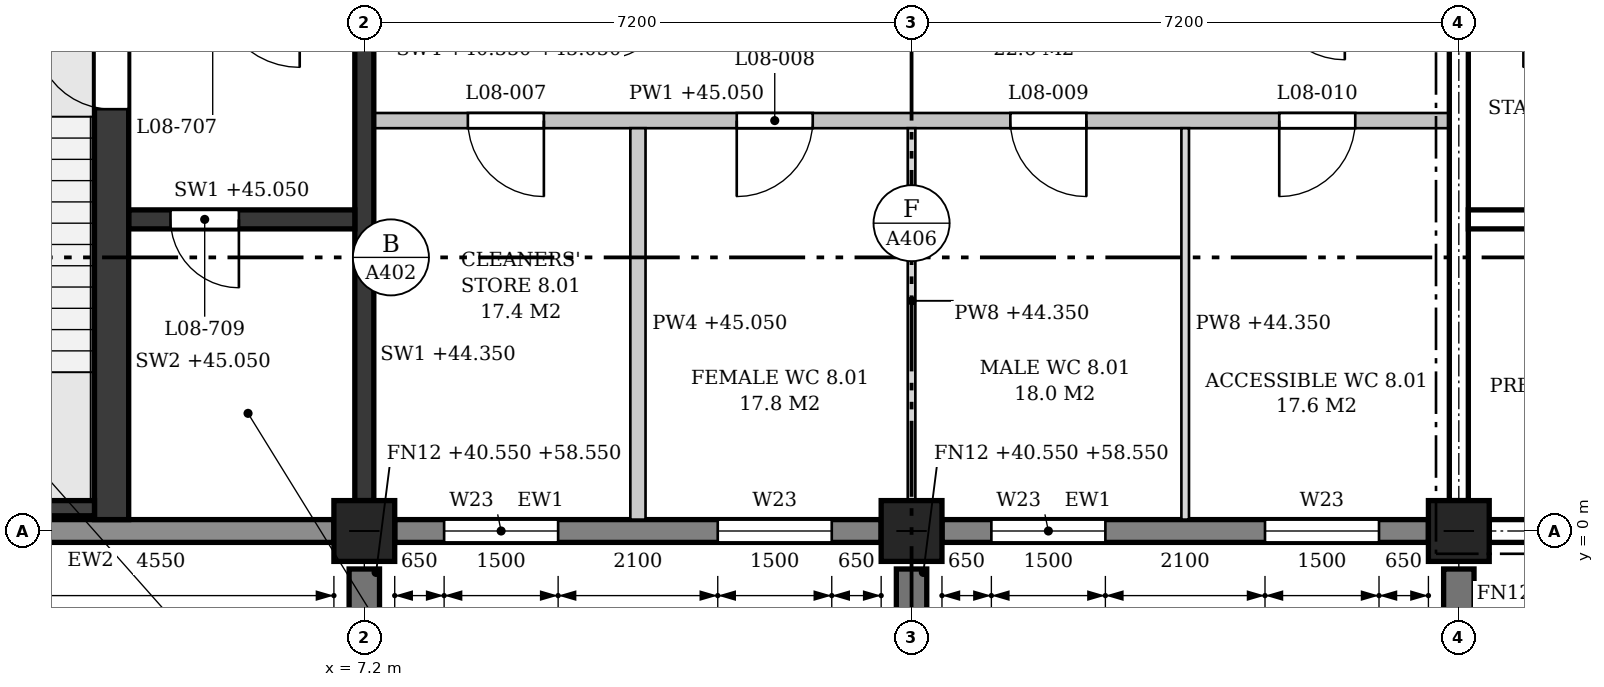
"""IFC4 building model, lengths in metres.
Left out: names, types, materials, properties, quantities, classifications, styles, units other than length and angle.
Written with IfcOpenShell. Run it as: python <this file> out.ifc"""

import sys

from ifc_helpers import new_model, si_unit, direction, frame, frame_2d, origin, origin_2d, place, context, subcontext, project, spatial, polyline, rectangle, outline, extrude, element, fill, save


model = new_model("IFC4")
c1 = context("Model", 3, precision=1e-05, world=origin(), true_north=direction((0.0, 1.0)))
c2 = subcontext(c1, "Body", "Model", "MODEL_VIEW")
j1 = project(units=[si_unit("LENGTHUNIT", "METRE"), si_unit("PLANEANGLEUNIT", "RADIAN")], contexts=[c1])
p1 = place(None, origin())
s1 = spatial("IfcSite", under=j1, at=p1, CompositionType="ELEMENT")
p2 = place(p1, origin())
s2 = spatial("IfcBuilding", under=s1, at=p2, CompositionType="ELEMENT")
p3 = place(p2, frame((0.0, 0.0, 40.8)))
s3 = spatial("IfcBuildingStorey", under=s2, at=p3, CompositionType="ELEMENT", Elevation=40.8)
for number, where, z_axis, x_axis in (
    (1, (7.2, 0.0, 0.0), (0.0, 0.0, 1.0), (1.0, 0.0, 0.0)),
    (2, (14.4, 0.0, 0.0), (0.0, 0.0, 1.0), (1.0, 0.0, 0.0)),
    (3, (21.6, 0.0, 0.0), (0.0, 0.0, 1.0), (1.0, 0.0, 0.0)),
):
    element("IfcColumn", number, at=place(p3, frame(where, z_axis=z_axis, x_axis=x_axis)), inside=s3, PredefinedType="COLUMN", context=c2, shape_type="SweptSolid", body=[
        extrude(rectangle(XDim=0.8, YDim=0.8, at=origin_2d()), origin(), (0.0, 0.0, 1.0), 4.5),
    ])
p4 = place(p3, frame((0.4, 0.0, 0.0), z_axis=(0.0, 0.0, 1.0), x_axis=(1.0, 0.0, 0.0)))
e4 = element("IfcWall", 4, at=p4, inside=s3, PredefinedType="STANDARD", context=c2, shape_type="SweptSolid", body=[
    extrude(rectangle(XDim=6.4, YDim=0.3, at=frame_2d((3.2, 0.0))), origin(), (0.0, 0.0, 1.0), 3.65),
])
p5 = place(p4, frame((0.95, 0.0, 0.9)))
e5 = element("IfcOpeningElement", 5, at=p5, cuts=e4, PredefinedType="OPENING", context=c2, shape_type="SweptSolid", body=[
    extrude(outline(polyline([(0.0, 0.0), (0.9, 0.0), (0.9, 2.25), (0.45, 2.7), (0.0, 2.25), (0.0, 0.0)])), frame((0.0, 0.16, 0.0), z_axis=(0.0, -1.0, 0.0), x_axis=(1.0, 0.0, 0.0)), (0.0, 0.0, 1.0), 0.32),
])
p6 = place(p3, frame((7.6, 0.0, 0.0), z_axis=(0.0, 0.0, 1.0), x_axis=(1.0, 0.0, 0.0)))
e6 = element("IfcWall", 6, at=p6, inside=s3, PredefinedType="STANDARD", context=c2, shape_type="SweptSolid", body=[
    extrude(rectangle(XDim=6.4, YDim=0.3, at=frame_2d((3.2, 0.0))), origin(), (0.0, 0.0, 1.0), 3.65),
])
p7 = place(p6, frame((0.65, 0.0, 0.9)))
e7 = element("IfcOpeningElement", 7, at=p7, cuts=e6, PredefinedType="OPENING", context=c2, shape_type="SweptSolid", body=[
    extrude(outline(polyline([(0.0, 0.0), (1.5, 0.0), (1.5, 1.95), (0.75, 2.7), (0.0, 1.95), (0.0, 0.0)])), frame((0.0, 0.16, 0.0), z_axis=(0.0, -1.0, 0.0), x_axis=(1.0, 0.0, 0.0)), (0.0, 0.0, 1.0), 0.32),
])
p8 = place(p6, frame((4.25, 0.0, 0.9)))
e8 = element("IfcOpeningElement", 8, at=p8, cuts=e6, PredefinedType="OPENING", context=c2, shape_type="SweptSolid", body=[
    extrude(outline(polyline([(0.0, 0.0), (1.5, 0.0), (1.5, 1.95), (0.75, 2.7), (0.0, 1.95), (0.0, 0.0)])), frame((0.0, 0.16, 0.0), z_axis=(0.0, -1.0, 0.0), x_axis=(1.0, 0.0, 0.0)), (0.0, 0.0, 1.0), 0.32),
])
p9 = place(p3, frame((14.8, 0.0, 0.0), z_axis=(0.0, 0.0, 1.0), x_axis=(1.0, 0.0, 0.0)))
e9 = element("IfcWall", 9, at=p9, inside=s3, PredefinedType="STANDARD", context=c2, shape_type="SweptSolid", body=[
    extrude(rectangle(XDim=6.4, YDim=0.3, at=frame_2d((3.2, 0.0))), origin(), (0.0, 0.0, 1.0), 3.65),
])
p10 = place(p9, frame((0.65, 0.0, 0.9)))
e10 = element("IfcOpeningElement", 10, at=p10, cuts=e9, PredefinedType="OPENING", context=c2, shape_type="SweptSolid", body=[
    extrude(outline(polyline([(0.0, 0.0), (1.5, 0.0), (1.5, 1.95), (0.75, 2.7), (0.0, 1.95), (0.0, 0.0)])), frame((0.0, 0.16, 0.0), z_axis=(0.0, -1.0, 0.0), x_axis=(1.0, 0.0, 0.0)), (0.0, 0.0, 1.0), 0.32),
])
p11 = place(p9, frame((4.25, 0.0, 0.9)))
e11 = element("IfcOpeningElement", 11, at=p11, cuts=e9, PredefinedType="OPENING", context=c2, shape_type="SweptSolid", body=[
    extrude(outline(polyline([(0.0, 0.0), (1.5, 0.0), (1.5, 1.95), (0.75, 2.7), (0.0, 1.95), (0.0, 0.0)])), frame((0.0, 0.16, 0.0), z_axis=(0.0, -1.0, 0.0), x_axis=(1.0, 0.0, 0.0)), (0.0, 0.0, 1.0), 0.32),
])
p12 = place(p3, frame((22.0, 0.0, 0.0), z_axis=(0.0, 0.0, 1.0), x_axis=(1.0, 0.0, 0.0)))
e12 = element("IfcWall", 12, at=p12, inside=s3, PredefinedType="STANDARD", context=c2, shape_type="SweptSolid", body=[
    extrude(rectangle(XDim=6.4, YDim=0.3, at=frame_2d((3.2, 0.0))), origin(), (0.0, 0.0, 1.0), 3.65),
])
p13 = place(p12, frame((4.55, 0.0, 0.9)))
e13 = element("IfcOpeningElement", 13, at=p13, cuts=e12, PredefinedType="OPENING", context=c2, shape_type="SweptSolid", body=[
    extrude(outline(polyline([(0.0, 0.0), (0.9, 0.0), (0.9, 2.25), (0.45, 2.7), (0.0, 2.25), (0.0, 0.0)])), frame((0.0, 0.16, 0.0), z_axis=(0.0, -1.0, 0.0), x_axis=(1.0, 0.0, 0.0)), (0.0, 0.0, 1.0), 0.32),
])
for number, where, z_axis, x_axis in (
    (14, (7.2, -0.5, -0.25), (0.0, 0.0, 1.0), (0.0, -1.0, 0.0)),
    (15, (14.4, -0.5, -0.25), (0.0, 0.0, 1.0), (0.0, -1.0, 0.0)),
    (16, (21.6, -0.5, -0.25), (0.0, 0.0, 1.0), (0.0, -1.0, 0.0)),
):
    element("IfcWall", number, at=place(p3, frame(where, z_axis=z_axis, x_axis=x_axis)), inside=s3, PredefinedType="POLYGONAL", context=c2, shape_type="SweptSolid", body=[
        extrude(outline(polyline([(0.65, 0.0), (0.65, 17.775), (0.5, 18.0), (0.0, 18.0), (0.0, 0.0), (0.65, 0.0)])), frame((0.0, 0.2, 0.0), z_axis=(0.0, -1.0, 0.0), x_axis=(1.0, 0.0, 0.0)), (0.0, 0.0, 1.0), 0.4),
    ])
p14 = place(p3, frame((7.2, 0.4, 0.0), z_axis=(0.0, 0.0, 1.0), x_axis=(0.0, 1.0, 0.0)))
e17 = element("IfcWall", 17, at=p14, inside=s3, PredefinedType="SHEAR", context=c2, shape_type="SweptSolid", body=[
    extrude(rectangle(XDim=6.4, YDim=0.25, at=frame_2d((3.2, 0.0))), origin(), (0.0, 0.0, 1.0), 3.55),
])
p15 = place(p3, frame((2.25, 0.3, -0.25), z_axis=(0.0, 0.0, 1.0), x_axis=(1.0, 0.0, 0.0)))
e18 = element("IfcWall", 18, at=p15, inside=s3, PredefinedType="SHEAR", context=c2, shape_type="SweptSolid", body=[
    extrude(rectangle(XDim=1.4, YDim=0.2, at=frame_2d((0.7, 0.0))), origin(), (0.0, 0.0, 1.0), 4.5),
])
p16 = place(p3, frame((3.875, 0.15, 0.0), z_axis=(0.0, 0.0, 1.0), x_axis=(0.0, 1.0, 0.0)))
e19 = element("IfcWall", 19, at=p16, inside=s3, PredefinedType="SHEAR", context=c2, shape_type="SweptSolid", body=[
    extrude(rectangle(XDim=6.925, YDim=0.45, at=frame_2d((3.462, 0.0))), origin(), (0.0, 0.0, 1.0), 4.25),
])
p17 = place(p16, frame((5.4, 0.0, 0.0)))
e20 = element("IfcOpeningElement", 20, at=p17, cuts=e19, PredefinedType="OPENING", context=c2, shape_type="SweptSolid", body=[
    extrude(rectangle(XDim=1.0, YDim=2.1, at=frame_2d((0.5, 1.05))), frame((0.0, 0.235, 0.0), z_axis=(0.0, -1.0, 0.0), x_axis=(1.0, 0.0, 0.0)), (0.0, 0.0, 1.0), 0.47),
])
p18 = place(p3, frame((4.1, 4.1, 0.0), z_axis=(0.0, 0.0, 1.0), x_axis=(1.0, 0.0, 0.0)))
e21 = element("IfcWall", 21, at=p18, inside=s3, PredefinedType="SHEAR", context=c2, shape_type="SweptSolid", body=[
    extrude(rectangle(XDim=2.975, YDim=0.25, at=frame_2d((1.487, 0.0))), origin(), (0.0, 0.0, 1.0), 4.25),
])
p19 = place(p18, frame((0.55, 0.0, 0.0)))
e22 = element("IfcOpeningElement", 22, at=p19, cuts=e21, PredefinedType="OPENING", context=c2, shape_type="SweptSolid", body=[
    extrude(rectangle(XDim=0.9, YDim=2.1, at=frame_2d((0.45, 1.05))), frame((0.0, 0.135, 0.0), z_axis=(0.0, -1.0, 0.0), x_axis=(1.0, 0.0, 0.0)), (0.0, 0.0, 1.0), 0.27),
])
p20 = place(p3, frame((21.6, 0.4, 0.0), z_axis=(0.0, 0.0, 1.0), x_axis=(0.0, 1.0, 0.0)))
e23 = element("IfcWall", 23, at=p20, inside=s3, PredefinedType="SHEAR", context=c2, shape_type="SweptSolid", body=[
    extrude(rectangle(XDim=6.4, YDim=0.25, at=frame_2d((3.2, 0.0))), origin(), (0.0, 0.0, 1.0), 3.55),
])
p21 = place(p3, frame((21.725, 4.1, 0.0), z_axis=(0.0, 0.0, 1.0), x_axis=(1.0, 0.0, 0.0)))
e24 = element("IfcWall", 24, at=p21, inside=s3, PredefinedType="SHEAR", context=c2, shape_type="SweptSolid", body=[
    extrude(rectangle(XDim=2.975, YDim=0.25, at=frame_2d((1.487, 0.0))), origin(), (0.0, 0.0, 1.0), 4.25),
])
p22 = place(p21, frame((1.525, 0.0, 0.0)))
e25 = element("IfcOpeningElement", 25, at=p22, cuts=e24, PredefinedType="OPENING", context=c2, shape_type="SweptSolid", body=[
    extrude(rectangle(XDim=0.9, YDim=2.1, at=frame_2d((0.45, 1.05))), frame((0.0, 0.135, 0.0), z_axis=(0.0, -1.0, 0.0), x_axis=(1.0, 0.0, 0.0)), (0.0, 0.0, 1.0), 0.27),
])
p23 = place(p3, frame((7.325, 5.4, 0.0), z_axis=(0.0, 0.0, 1.0), x_axis=(1.0, 0.0, 0.0)))
e26 = element("IfcWall", 26, at=p23, inside=s3, PredefinedType="PARTITIONING", context=c2, shape_type="SweptSolid", body=[
    extrude(outline(polyline([(0.0, 0.0), (14.15, 0.0), (14.15, 3.55), (14.05, 3.55), (14.05, 4.25), (7.3, 4.25), (7.3, 3.55), (6.85, 3.55), (6.85, 4.25), (0.1, 4.25), (0.1, 3.55), (0.0, 3.55), (0.0, 0.0)])), frame((0.0, 0.1, 0.0), z_axis=(0.0, -1.0, 0.0), x_axis=(1.0, 0.0, 0.0)), (0.0, 0.0, 1.0), 0.2),
])
p24 = place(p23, frame((1.238, 0.0, 0.0)))
e27 = element("IfcOpeningElement", 27, at=p24, cuts=e26, PredefinedType="OPENING", context=c2, shape_type="SweptSolid", body=[
    extrude(rectangle(XDim=1.0, YDim=2.1, at=frame_2d((0.5, 1.05))), frame((0.0, 0.11, 0.0), z_axis=(0.0, -1.0, 0.0), x_axis=(1.0, 0.0, 0.0)), (0.0, 0.0, 1.0), 0.22),
])
p25 = place(p23, frame((4.775, 0.0, 0.0)))
e28 = element("IfcOpeningElement", 28, at=p25, cuts=e26, PredefinedType="OPENING", context=c2, shape_type="SweptSolid", body=[
    extrude(rectangle(XDim=1.0, YDim=2.1, at=frame_2d((0.5, 1.05))), frame((0.0, 0.11, 0.0), z_axis=(0.0, -1.0, 0.0), x_axis=(1.0, 0.0, 0.0)), (0.0, 0.0, 1.0), 0.22),
])
p26 = place(p23, frame((8.375, 0.0, 0.0)))
e29 = element("IfcOpeningElement", 29, at=p26, cuts=e26, PredefinedType="OPENING", context=c2, shape_type="SweptSolid", body=[
    extrude(rectangle(XDim=1.0, YDim=2.1, at=frame_2d((0.5, 1.05))), frame((0.0, 0.11, 0.0), z_axis=(0.0, -1.0, 0.0), x_axis=(1.0, 0.0, 0.0)), (0.0, 0.0, 1.0), 0.22),
])
p27 = place(p23, frame((11.913, 0.0, 0.0)))
e30 = element("IfcOpeningElement", 30, at=p27, cuts=e26, PredefinedType="OPENING", context=c2, shape_type="SweptSolid", body=[
    extrude(rectangle(XDim=1.0, YDim=2.1, at=frame_2d((0.5, 1.05))), frame((0.0, 0.11, 0.0), z_axis=(0.0, -1.0, 0.0), x_axis=(1.0, 0.0, 0.0)), (0.0, 0.0, 1.0), 0.22),
])
p28 = place(p3, frame((10.8, 0.15, 0.0), z_axis=(0.0, 0.0, 1.0), x_axis=(0.0, 1.0, 0.0)))
e31 = element("IfcWall", 31, at=p28, inside=s3, PredefinedType="PARTITIONING", context=c2, shape_type="SweptSolid", body=[
    extrude(outline(polyline([(0.0, 0.0), (5.15, 0.0), (5.15, 4.25), (0.05, 4.25), (0.05, 3.65), (0.0, 3.65), (0.0, 0.0)])), frame((0.0, 0.1, 0.0), z_axis=(0.0, -1.0, 0.0), x_axis=(1.0, 0.0, 0.0)), (0.0, 0.0, 1.0), 0.2),
])
p29 = place(p3, frame((14.4, 0.4, 0.0), z_axis=(0.0, 0.0, 1.0), x_axis=(0.0, 1.0, 0.0)))
e32 = element("IfcWall", 32, at=p29, inside=s3, PredefinedType="PARTITIONING", context=c2, shape_type="SweptSolid", body=[
    extrude(rectangle(XDim=4.9, YDim=0.1, at=frame_2d((2.45, 0.0))), origin(), (0.0, 0.0, 1.0), 3.55),
])
p30 = place(p3, frame((18.0, 0.15, 0.0), z_axis=(0.0, 0.0, 1.0), x_axis=(0.0, 1.0, 0.0)))
e33 = element("IfcWall", 33, at=p30, inside=s3, PredefinedType="PARTITIONING", context=c2, shape_type="SweptSolid", body=[
    extrude(rectangle(XDim=5.15, YDim=0.1, at=frame_2d((2.575, 0.0))), origin(), (0.0, 0.0, 1.0), 3.55),
])
p31 = place(p7, origin())
e34 = element("IfcWindow", 34, at=p31, inside=s3, PartitioningType="SINGLE_PANEL", PredefinedType="WINDOW", context=c2, shape_type="SweptSolid", body=[
    extrude(outline(polyline([(0.0, 0.0), (1.5, 0.0), (1.5, 1.95), (0.75, 2.7), (0.0, 1.95), (0.0, 0.0)])), frame((0.0, 0.03, 0.0), z_axis=(0.0, -1.0, 0.0), x_axis=(1.0, 0.0, 0.0)), (0.0, 0.0, 1.0), 0.06),
])
fill(e7, e34)
p32 = place(p8, origin())
e35 = element("IfcWindow", 35, at=p32, inside=s3, PartitioningType="SINGLE_PANEL", PredefinedType="WINDOW", context=c2, shape_type="SweptSolid", body=[
    extrude(outline(polyline([(0.0, 0.0), (1.5, 0.0), (1.5, 1.95), (0.75, 2.7), (0.0, 1.95), (0.0, 0.0)])), frame((0.0, 0.03, 0.0), z_axis=(0.0, -1.0, 0.0), x_axis=(1.0, 0.0, 0.0)), (0.0, 0.0, 1.0), 0.06),
])
fill(e8, e35)
p33 = place(p10, origin())
e36 = element("IfcWindow", 36, at=p33, inside=s3, PartitioningType="SINGLE_PANEL", PredefinedType="WINDOW", context=c2, shape_type="SweptSolid", body=[
    extrude(outline(polyline([(0.0, 0.0), (1.5, 0.0), (1.5, 1.95), (0.75, 2.7), (0.0, 1.95), (0.0, 0.0)])), frame((0.0, 0.03, 0.0), z_axis=(0.0, -1.0, 0.0), x_axis=(1.0, 0.0, 0.0)), (0.0, 0.0, 1.0), 0.06),
])
fill(e10, e36)
p34 = place(p11, origin())
e37 = element("IfcWindow", 37, at=p34, inside=s3, PartitioningType="SINGLE_PANEL", PredefinedType="WINDOW", context=c2, shape_type="SweptSolid", body=[
    extrude(outline(polyline([(0.0, 0.0), (1.5, 0.0), (1.5, 1.95), (0.75, 2.7), (0.0, 1.95), (0.0, 0.0)])), frame((0.0, 0.03, 0.0), z_axis=(0.0, -1.0, 0.0), x_axis=(1.0, 0.0, 0.0)), (0.0, 0.0, 1.0), 0.06),
])
fill(e11, e37)
p35 = place(p17, origin())
e38 = element("IfcDoor", 38, at=p35, inside=s3, OperationType="SINGLE_SWING_RIGHT", PredefinedType="DOOR", context=c2, shape_type="SweptSolid", body=[
    extrude(rectangle(XDim=1.0, YDim=2.1, at=frame_2d((0.5, 1.05))), frame((0.0, 0.025, 0.0), z_axis=(0.0, -1.0, 0.0), x_axis=(1.0, 0.0, 0.0)), (0.0, 0.0, 1.0), 0.05),
])
fill(e20, e38)
p36 = place(p19, frame((0.9, 0.0, 0.0), z_axis=(0.0, 0.0, 1.0), x_axis=(-1.0, 0.0, 0.0)))
e39 = element("IfcDoor", 39, at=p36, inside=s3, OperationType="SINGLE_SWING_LEFT", PredefinedType="DOOR", context=c2, shape_type="SweptSolid", body=[
    extrude(rectangle(XDim=0.9, YDim=2.1, at=frame_2d((0.45, 1.05))), frame((0.0, 0.025, 0.0), z_axis=(0.0, -1.0, 0.0), x_axis=(1.0, 0.0, 0.0)), (0.0, 0.0, 1.0), 0.05),
])
fill(e22, e39)
p37 = place(p24, frame((1.0, 0.0, 0.0), z_axis=(0.0, 0.0, 1.0), x_axis=(-1.0, 0.0, 0.0)))
e40 = element("IfcDoor", 40, at=p37, inside=s3, OperationType="SINGLE_SWING_LEFT", PredefinedType="DOOR", context=c2, shape_type="SweptSolid", body=[
    extrude(rectangle(XDim=1.0, YDim=2.1, at=frame_2d((0.5, 1.05))), frame((0.0, 0.025, 0.0), z_axis=(0.0, -1.0, 0.0), x_axis=(1.0, 0.0, 0.0)), (0.0, 0.0, 1.0), 0.05),
])
fill(e27, e40)
p38 = place(p25, frame((1.0, 0.0, 0.0), z_axis=(0.0, 0.0, 1.0), x_axis=(-1.0, 0.0, 0.0)))
e41 = element("IfcDoor", 41, at=p38, inside=s3, OperationType="SINGLE_SWING_RIGHT", PredefinedType="DOOR", context=c2, shape_type="SweptSolid", body=[
    extrude(rectangle(XDim=1.0, YDim=2.1, at=frame_2d((0.5, 1.05))), frame((0.0, 0.025, 0.0), z_axis=(0.0, -1.0, 0.0), x_axis=(1.0, 0.0, 0.0)), (0.0, 0.0, 1.0), 0.05),
])
fill(e28, e41)
p39 = place(p26, frame((1.0, 0.0, 0.0), z_axis=(0.0, 0.0, 1.0), x_axis=(-1.0, 0.0, 0.0)))
e42 = element("IfcDoor", 42, at=p39, inside=s3, OperationType="SINGLE_SWING_LEFT", PredefinedType="DOOR", context=c2, shape_type="SweptSolid", body=[
    extrude(rectangle(XDim=1.0, YDim=2.1, at=frame_2d((0.5, 1.05))), frame((0.0, 0.025, 0.0), z_axis=(0.0, -1.0, 0.0), x_axis=(1.0, 0.0, 0.0)), (0.0, 0.0, 1.0), 0.05),
])
fill(e29, e42)
p40 = place(p27, frame((1.0, 0.0, 0.0), z_axis=(0.0, 0.0, 1.0), x_axis=(-1.0, 0.0, 0.0)))
e43 = element("IfcDoor", 43, at=p40, inside=s3, OperationType="SINGLE_SWING_RIGHT", PredefinedType="DOOR", context=c2, shape_type="SweptSolid", body=[
    extrude(rectangle(XDim=1.0, YDim=2.1, at=frame_2d((0.5, 1.05))), frame((0.0, 0.025, 0.0), z_axis=(0.0, -1.0, 0.0), x_axis=(1.0, 0.0, 0.0)), (0.0, 0.0, 1.0), 0.05),
])
fill(e30, e43)
save(model, sys.argv[1])
